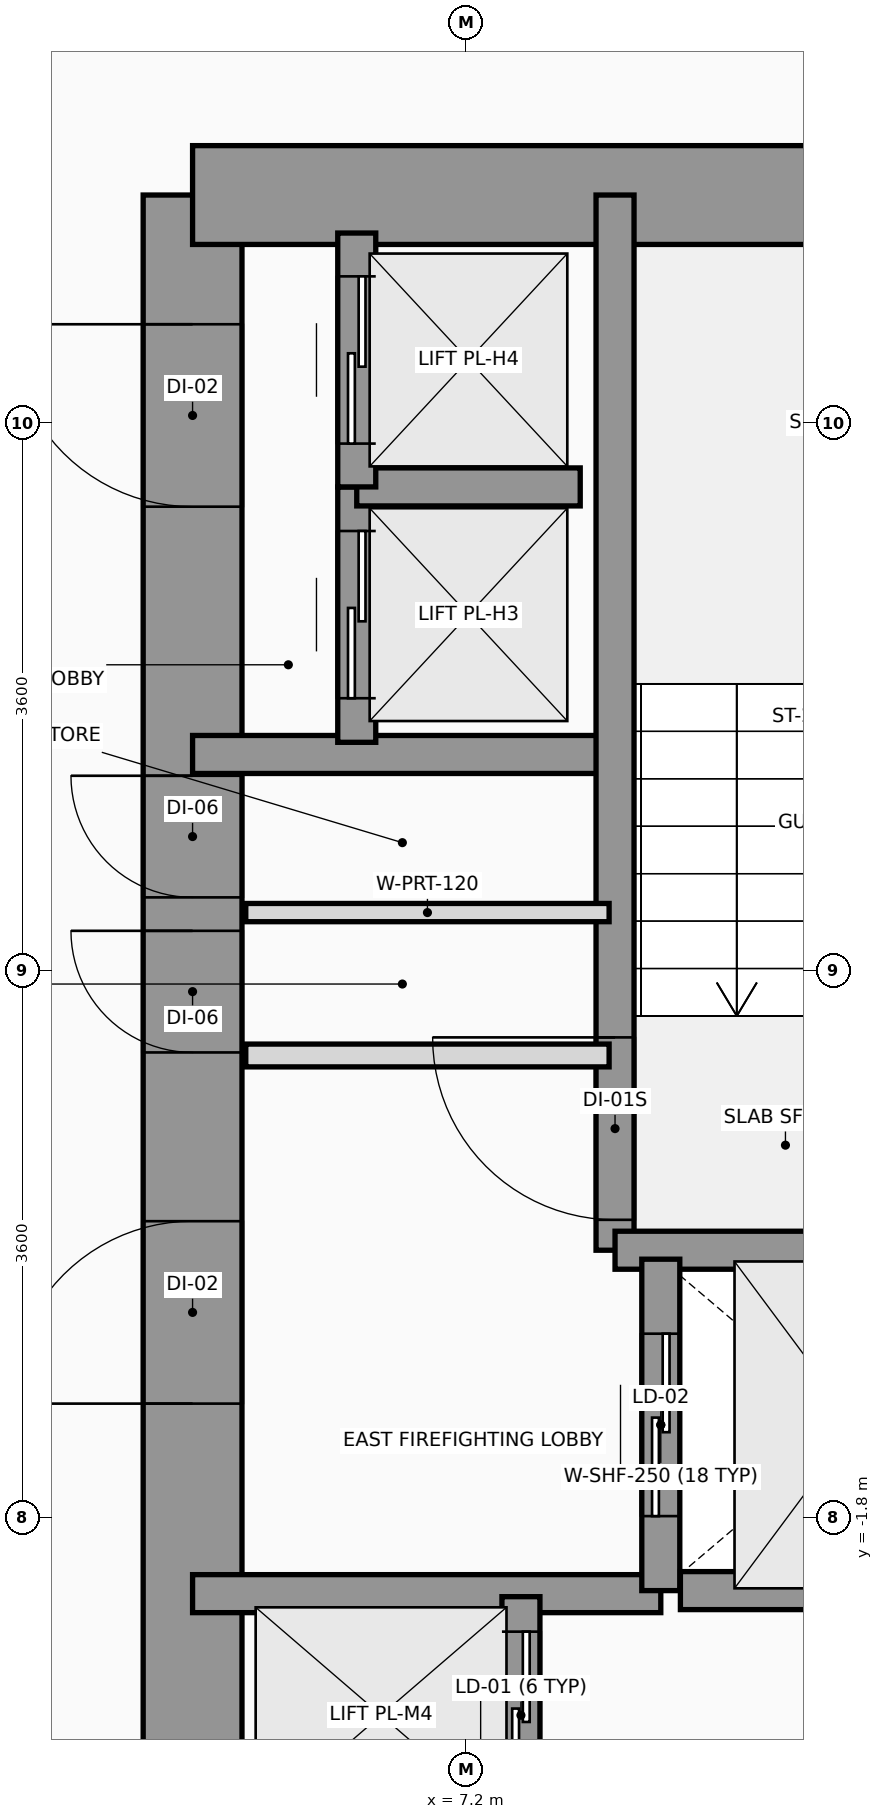
"""IFC4 building model, lengths in metres.
Left out: names, types, materials, properties, quantities, classifications, styles, units other than length and angle.
Written with IfcOpenShell. Run it as: python <this file> out.ifc"""

import sys

from ifc_helpers import new_model, si_unit, direction, frame, frame_2d, origin, place, context, subcontext, project, spatial, rectangle, extrude, source, transform, mapped, element, fill, save


model = new_model("IFC4")
c1 = context("Model", 3, precision=1e-05, world=origin(), true_north=direction((0.0, 1.0)))
c2 = subcontext(c1, "Body", "Model", "MODEL_VIEW")
j1 = project(units=[si_unit("LENGTHUNIT", "METRE"), si_unit("PLANEANGLEUNIT", "RADIAN")], contexts=[c1])
p1 = place(None, origin())
s1 = spatial("IfcSite", under=j1, at=p1, CompositionType="ELEMENT")
p2 = place(p1, origin())
s2 = spatial("IfcBuilding", under=s1, at=p2, CompositionType="ELEMENT")
p3 = place(p2, origin())
s3 = spatial("IfcBuildingStorey", under=s2, at=p3, CompositionType="ELEMENT", Elevation=0.0)
p4 = place(p3, frame((5.4, -5.6, 0.0), z_axis=(0.0, 0.0, 1.0), x_axis=(0.0, 1.0, 0.0)))
e1 = element("IfcWall", 1, at=p4, inside=s3, PredefinedType="SHEAR", context=c2, shape_type="SweptSolid", body=[
    extrude(rectangle(XDim=12.5, YDim=0.65, at=frame_2d((6.25, 0.0))), origin(), (0.0, 0.0, 1.0), 5.15),
])
p5 = place(p4, frame((4.55, 0.0, 0.0)))
e2 = element("IfcOpeningElement", 2, at=p5, cuts=e1, PredefinedType="OPENING", context=c2, shape_type="SweptSolid", body=[
    extrude(rectangle(XDim=1.2, YDim=2.2, at=frame_2d((0.6, 1.1))), frame((0.0, 0.335, 0.0), z_axis=(0.0, -1.0, 0.0), x_axis=(1.0, 0.0, 0.0)), (0.0, 0.0, 1.0), 0.67),
])
p6 = place(p4, frame((10.45, 0.0, 0.0)))
e3 = element("IfcOpeningElement", 3, at=p6, cuts=e1, PredefinedType="OPENING", context=c2, shape_type="SweptSolid", body=[
    extrude(rectangle(XDim=1.2, YDim=2.2, at=frame_2d((0.6, 1.1))), frame((0.0, 0.335, 0.0), z_axis=(0.0, -1.0, 0.0), x_axis=(1.0, 0.0, 0.0)), (0.0, 0.0, 1.0), 0.67),
])
p7 = place(p4, frame((6.86, 0.0, 0.0)))
e4 = element("IfcOpeningElement", 4, at=p7, cuts=e1, PredefinedType="OPENING", context=c2, shape_type="SweptSolid", body=[
    extrude(rectangle(XDim=0.8, YDim=2.1, at=frame_2d((0.4, 1.05))), frame((0.0, 0.335, 0.0), z_axis=(0.0, -1.0, 0.0), x_axis=(1.0, 0.0, 0.0)), (0.0, 0.0, 1.0), 0.67),
])
p8 = place(p4, frame((7.88, 0.0, 0.0)))
e5 = element("IfcOpeningElement", 5, at=p8, cuts=e1, PredefinedType="OPENING", context=c2, shape_type="SweptSolid", body=[
    extrude(rectangle(XDim=0.8, YDim=2.1, at=frame_2d((0.4, 1.05))), frame((0.0, 0.335, 0.0), z_axis=(0.0, -1.0, 0.0), x_axis=(1.0, 0.0, 0.0)), (0.0, 0.0, 1.0), 0.67),
])
p9 = place(p3, frame((5.4, 6.9, 0.0), z_axis=(0.0, 0.0, 1.0), x_axis=(1.0, 0.0, 0.0)))
e6 = element("IfcWall", 6, at=p9, inside=s3, PredefinedType="SHEAR", context=c2, shape_type="SweptSolid", body=[
    extrude(rectangle(XDim=5.981, YDim=0.65, at=frame_2d((2.991, 0.0))), origin(), (0.0, 0.0, 1.0), 5.15),
])
p10 = place(p3, frame((5.4, 3.22, 0.0), z_axis=(0.0, 0.0, 1.0), x_axis=(1.0, 0.0, 0.0)))
e7 = element("IfcWall", 7, at=p10, inside=s3, PredefinedType="SOLIDWALL", context=c2, shape_type="SweptSolid", body=[
    extrude(rectangle(XDim=2.78, YDim=0.25, at=frame_2d((1.39, 0.0))), origin(), (0.0, 0.0, 1.0), 5.15),
])
p11 = place(p3, frame((5.4, -2.3, 0.0), z_axis=(0.0, 0.0, 1.0), x_axis=(1.0, 0.0, 0.0)))
e8 = element("IfcWall", 8, at=p11, inside=s3, PredefinedType="SOLIDWALL", context=c2, shape_type="SweptSolid", body=[
    extrude(rectangle(XDim=3.08, YDim=0.25, at=frame_2d((1.54, 0.0))), origin(), (0.0, 0.0, 1.0), 5.15),
])
p12 = place(p3, frame((8.179, -0.041, 0.0), z_axis=(0.0, 0.0, 1.0), x_axis=(0.0, 1.0, 0.0)))
e9 = element("IfcWall", 9, at=p12, inside=s3, PredefinedType="SOLIDWALL", context=c2, shape_type="SweptSolid", body=[
    extrude(rectangle(XDim=6.941, YDim=0.25, at=frame_2d((3.47, 0.0))), origin(), (0.0, 0.0, 1.0), 5.15),
])
p13 = place(p12, frame((0.2, 0.0, 0.0)))
e10 = element("IfcOpeningElement", 10, at=p13, cuts=e9, PredefinedType="OPENING", context=c2, shape_type="SweptSolid", body=[
    extrude(rectangle(XDim=1.2, YDim=2.2, at=frame_2d((0.6, 1.1))), frame((0.0, 0.135, 0.0), z_axis=(0.0, -1.0, 0.0), x_axis=(1.0, 0.0, 0.0)), (0.0, 0.0, 1.0), 0.27),
])
p14 = place(p3, frame((8.179, -0.041, 0.0), z_axis=(0.0, 0.0, 1.0), x_axis=(1.0, 0.0, 0.0)))
e11 = element("IfcWall", 11, at=p14, inside=s3, PredefinedType="SOLIDWALL", context=c2, shape_type="SweptSolid", body=[
    extrude(rectangle(XDim=3.202, YDim=0.25, at=frame_2d((1.601, 0.0))), origin(), (0.0, 0.0, 1.0), 5.15),
])
p15 = place(p3, frame((8.48, -2.28, 0.0), z_axis=(0.0, 0.0, 1.0), x_axis=(0.0, 1.0, 0.0)))
e12 = element("IfcWall", 12, at=p15, inside=s3, PredefinedType="SOLIDWALL", context=c2, shape_type="SweptSolid", body=[
    extrude(rectangle(XDim=2.18, YDim=0.25, at=frame_2d((1.09, 0.0))), origin(), (0.0, 0.0, 1.0), 5.15),
])
p16 = place(p15, frame((0.49, 0.0, 0.0)))
e13 = element("IfcOpeningElement", 13, at=p16, cuts=e12, PredefinedType="OPENING", context=c2, shape_type="SweptSolid", body=[
    extrude(rectangle(XDim=1.2, YDim=2.2, at=frame_2d((0.6, 1.1))), frame((0.0, 0.135, 0.0), z_axis=(0.0, -1.0, 0.0), x_axis=(1.0, 0.0, 0.0)), (0.0, 0.0, 1.0), 0.27),
])
p17 = place(p3, frame((8.609, -2.28, 0.0), z_axis=(0.0, 0.0, 1.0), x_axis=(1.0, 0.0, 0.0)))
e14 = element("IfcWall", 14, at=p17, inside=s3, PredefinedType="SOLIDWALL", context=c2, shape_type="SweptSolid", body=[
    extrude(rectangle(XDim=2.312, YDim=0.25, at=frame_2d((1.156, 0.0))), origin(), (0.0, 0.0, 1.0), 5.15),
])
p18 = place(p3, frame((7.56, -3.88, 0.0), z_axis=(0.0, 0.0, 1.0), x_axis=(0.0, 1.0, 0.0)))
e15 = element("IfcWall", 15, at=p18, inside=s3, PredefinedType="SOLIDWALL", context=c2, shape_type="SweptSolid", body=[
    extrude(rectangle(XDim=1.56, YDim=0.25, at=frame_2d((0.78, 0.0))), origin(), (0.0, 0.0, 1.0), 5.15),
])
p19 = place(p18, frame((0.23, 0.0, 0.0)))
e16 = element("IfcOpeningElement", 16, at=p19, cuts=e15, PredefinedType="OPENING", context=c2, shape_type="SweptSolid", body=[
    extrude(rectangle(XDim=1.1, YDim=2.2, at=frame_2d((0.55, 1.1))), frame((0.0, 0.135, 0.0), z_axis=(0.0, -1.0, 0.0), x_axis=(1.0, 0.0, 0.0)), (0.0, 0.0, 1.0), 0.27),
])
p20 = place(p3, frame((6.48, 3.3, 0.0), z_axis=(0.0, 0.0, 1.0), x_axis=(0.0, 1.0, 0.0)))
e17 = element("IfcWall", 17, at=p20, inside=s3, PredefinedType="SOLIDWALL", context=c2, shape_type="SweptSolid", body=[
    extrude(rectangle(XDim=1.68, YDim=0.25, at=frame_2d((0.84, 0.0))), origin(), (0.0, 0.0, 1.0), 5.15),
])
p21 = place(p20, frame((0.29, 0.0, 0.0)))
e18 = element("IfcOpeningElement", 18, at=p21, cuts=e17, PredefinedType="OPENING", context=c2, shape_type="SweptSolid", body=[
    extrude(rectangle(XDim=1.1, YDim=2.2, at=frame_2d((0.55, 1.1))), frame((0.0, 0.135, 0.0), z_axis=(0.0, -1.0, 0.0), x_axis=(1.0, 0.0, 0.0)), (0.0, 0.0, 1.0), 0.27),
])
p22 = place(p3, frame((6.48, 4.98, 0.0), z_axis=(0.0, 0.0, 1.0), x_axis=(1.0, 0.0, 0.0)))
e19 = element("IfcWall", 19, at=p22, inside=s3, PredefinedType="SOLIDWALL", context=c2, shape_type="SweptSolid", body=[
    extrude(rectangle(XDim=1.47, YDim=0.25, at=frame_2d((0.735, 0.0))), origin(), (0.0, 0.0, 1.0), 5.15),
])
p23 = place(p3, frame((6.48, 4.98, 0.0), z_axis=(0.0, 0.0, 1.0), x_axis=(0.0, 1.0, 0.0)))
e20 = element("IfcWall", 20, at=p23, inside=s3, PredefinedType="SOLIDWALL", context=c2, shape_type="SweptSolid", body=[
    extrude(rectangle(XDim=1.67, YDim=0.25, at=frame_2d((0.835, 0.0))), origin(), (0.0, 0.0, 1.0), 5.15),
])
p24 = place(p23, frame((0.285, 0.0, 0.0)))
e21 = element("IfcOpeningElement", 21, at=p24, cuts=e20, PredefinedType="OPENING", context=c2, shape_type="SweptSolid", body=[
    extrude(rectangle(XDim=1.1, YDim=2.2, at=frame_2d((0.55, 1.1))), frame((0.0, 0.135, 0.0), z_axis=(0.0, -1.0, 0.0), x_axis=(1.0, 0.0, 0.0)), (0.0, 0.0, 1.0), 0.27),
])
p25 = place(p3, frame((5.75, 1.24, 0.0), z_axis=(0.0, 0.0, 1.0), x_axis=(1.0, 0.0, 0.0)))
e22 = element("IfcWall", 22, at=p25, inside=s3, PredefinedType="PARTITIONING", context=c2, shape_type="SweptSolid", body=[
    extrude(rectangle(XDim=2.39, YDim=0.15, at=frame_2d((1.195, 0.0))), origin(), (0.0, 0.0, 1.0), 4.25),
])
p26 = place(p3, frame((5.75, 2.18, 0.0), z_axis=(0.0, 0.0, 1.0), x_axis=(1.0, 0.0, 0.0)))
e23 = element("IfcWall", 23, at=p26, inside=s3, PredefinedType="PARTITIONING", context=c2, shape_type="SweptSolid", body=[
    extrude(rectangle(XDim=2.39, YDim=0.12, at=frame_2d((1.195, 0.0))), origin(), (0.0, 0.0, 1.0), 4.25),
])
m1 = source(origin(), c2, "Body", "SweptSolid", [
    extrude(rectangle(XDim=1.2, YDim=2.2, at=frame_2d((0.6, 1.1))), frame((0.0, 0.025, 0.0), z_axis=(0.0, -1.0, 0.0), x_axis=(1.0, 0.0, 0.0)), (0.0, 0.0, 1.0), 0.05),
])
p27 = place(p13, origin())
e24 = element("IfcDoor", 24, at=p27, inside=s3, OperationType="SINGLE_SWING_RIGHT", PredefinedType="DOOR", context=c2, shape_type="MappedRepresentation", body=[
    mapped(m1, transform((0.0, 0.0, 0.0), x_axis=(1.0, 0.0, 0.0), y_axis=(0.0, 1.0, 0.0), z_axis=(0.0, 0.0, 1.0), scale=1.0)),
])
fill(e10, e24)
p28 = place(p5, origin())
e25 = element("IfcDoor", 25, at=p28, inside=s3, OperationType="SINGLE_SWING_LEFT", PredefinedType="DOOR", context=c2, shape_type="MappedRepresentation", body=[
    mapped(m1, transform((0.0, 0.0, 0.0), x_axis=(1.0, 0.0, 0.0), y_axis=(0.0, 1.0, 0.0), z_axis=(0.0, 0.0, 1.0), scale=1.0)),
])
fill(e2, e25)
p29 = place(p6, origin())
e26 = element("IfcDoor", 26, at=p29, inside=s3, OperationType="SINGLE_SWING_RIGHT", PredefinedType="DOOR", context=c2, shape_type="MappedRepresentation", body=[
    mapped(m1, transform((0.0, 0.0, 0.0), x_axis=(1.0, 0.0, 0.0), y_axis=(0.0, 1.0, 0.0), z_axis=(0.0, 0.0, 1.0), scale=1.0)),
])
fill(e3, e26)
m2 = source(origin(), c2, "Body", "SweptSolid", [
    extrude(rectangle(XDim=0.8, YDim=2.1, at=frame_2d((0.4, 1.05))), frame((0.0, 0.025, 0.0), z_axis=(0.0, -1.0, 0.0), x_axis=(1.0, 0.0, 0.0)), (0.0, 0.0, 1.0), 0.05),
])
p30 = place(p7, origin())
e27 = element("IfcDoor", 27, at=p30, inside=s3, OperationType="SINGLE_SWING_RIGHT", PredefinedType="DOOR", context=c2, shape_type="MappedRepresentation", body=[
    mapped(m2, transform((0.0, 0.0, 0.0), x_axis=(1.0, 0.0, 0.0), y_axis=(0.0, 1.0, 0.0), z_axis=(0.0, 0.0, 1.0), scale=1.0)),
])
fill(e4, e27)
p31 = place(p8, origin())
e28 = element("IfcDoor", 28, at=p31, inside=s3, OperationType="SINGLE_SWING_RIGHT", PredefinedType="DOOR", context=c2, shape_type="MappedRepresentation", body=[
    mapped(m2, transform((0.0, 0.0, 0.0), x_axis=(1.0, 0.0, 0.0), y_axis=(0.0, 1.0, 0.0), z_axis=(0.0, 0.0, 1.0), scale=1.0)),
])
fill(e5, e28)
p32 = place(p16, origin())
e29 = element("IfcDoor", 29, at=p32, inside=s3, OperationType="SLIDING_TO_RIGHT", PredefinedType="DOOR", context=c2, shape_type="MappedRepresentation", body=[
    mapped(m1, transform((0.0, 0.0, 0.0), x_axis=(1.0, 0.0, 0.0), y_axis=(0.0, 1.0, 0.0), z_axis=(0.0, 0.0, 1.0), scale=1.0)),
])
fill(e13, e29)
m3 = source(origin(), c2, "Body", "SweptSolid", [
    extrude(rectangle(XDim=1.1, YDim=2.2, at=frame_2d((0.55, 1.1))), frame((0.0, 0.025, 0.0), z_axis=(0.0, -1.0, 0.0), x_axis=(1.0, 0.0, 0.0)), (0.0, 0.0, 1.0), 0.05),
])
p33 = place(p19, origin())
e30 = element("IfcDoor", 30, at=p33, inside=s3, OperationType="SLIDING_TO_LEFT", PredefinedType="DOOR", context=c2, shape_type="MappedRepresentation", body=[
    mapped(m3, transform((0.0, 0.0, 0.0), x_axis=(1.0, 0.0, 0.0), y_axis=(0.0, 1.0, 0.0), z_axis=(0.0, 0.0, 1.0), scale=1.0)),
])
fill(e16, e30)
p34 = place(p21, origin())
e31 = element("IfcDoor", 31, at=p34, inside=s3, OperationType="SLIDING_TO_LEFT", PredefinedType="DOOR", context=c2, shape_type="MappedRepresentation", body=[
    mapped(m3, transform((0.0, 0.0, 0.0), x_axis=(1.0, 0.0, 0.0), y_axis=(0.0, 1.0, 0.0), z_axis=(0.0, 0.0, 1.0), scale=1.0)),
])
fill(e18, e31)
p35 = place(p24, origin())
e32 = element("IfcDoor", 32, at=p35, inside=s3, OperationType="SLIDING_TO_LEFT", PredefinedType="DOOR", context=c2, shape_type="MappedRepresentation", body=[
    mapped(m3, transform((0.0, 0.0, 0.0), x_axis=(1.0, 0.0, 0.0), y_axis=(0.0, 1.0, 0.0), z_axis=(0.0, 0.0, 1.0), scale=1.0)),
])
fill(e21, e32)
save(model, sys.argv[1])
